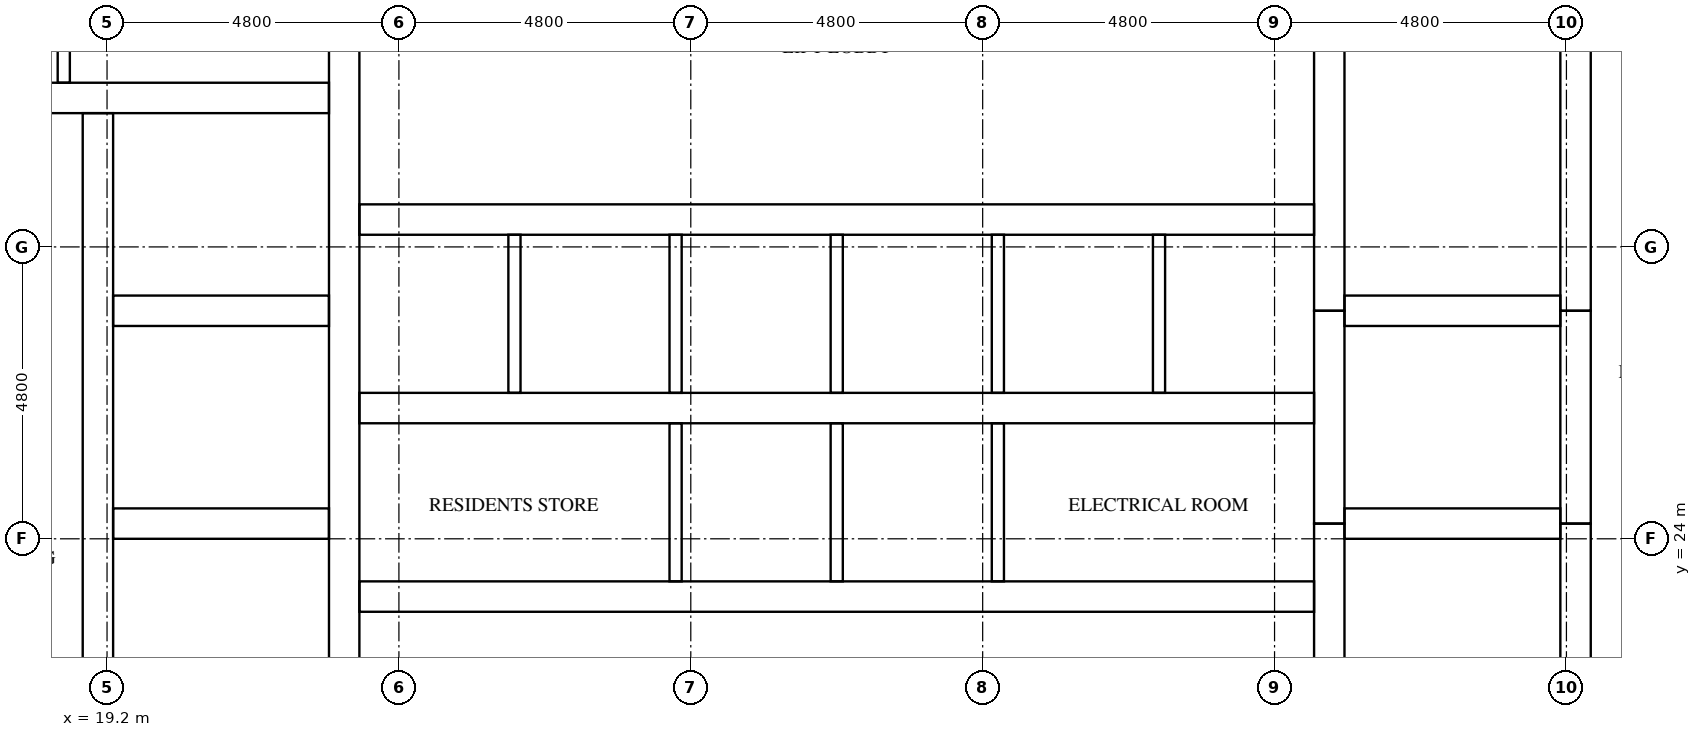
"""IFC4 building model, lengths in metres.
Left out: names, types, materials, properties, quantities, classifications, styles, units other than length and angle.
Written with IfcOpenShell. Run it as: python <this file> out.ifc"""

import sys

from ifc_helpers import new_model, si_unit, direction, frame, frame_2d, origin, place, context, subcontext, project, spatial, rectangle, extrude, element, fill, save


model = new_model("IFC4")
c1 = context("Model", 3, precision=1e-05, world=origin(), true_north=direction((0.0, 1.0)))
c2 = subcontext(c1, "Body", "Model", "MODEL_VIEW")
j1 = project(units=[si_unit("LENGTHUNIT", "METRE"), si_unit("PLANEANGLEUNIT", "RADIAN")], contexts=[c1])
p1 = place(None, origin())
s1 = spatial("IfcSite", under=j1, at=p1, CompositionType="ELEMENT")
p2 = place(p1, origin())
s2 = spatial("IfcBuilding", under=s1, at=p2, CompositionType="ELEMENT")
p3 = place(p2, frame((0.0, 0.0, 229.8)))
s3 = spatial("IfcBuildingStorey", under=s2, at=p3, CompositionType="ELEMENT", Elevation=229.8)
p4 = place(p3, frame((19.05, 15.7, 0.0), z_axis=(0.0, 0.0, 1.0), x_axis=(0.0, 1.0, 0.0)))
e1 = element("IfcWall", 1, at=p4, inside=s3, PredefinedType="SHEAR", context=c2, shape_type="SweptSolid", body=[
    extrude(rectangle(XDim=15.3, YDim=0.5, at=frame_2d((7.65, 0.0))), origin(), (0.0, 0.0, 1.0), 3.1),
])
p5 = place(p4, frame((9.75, 0.0, 0.0)))
e2 = element("IfcOpeningElement", 2, at=p5, cuts=e1, PredefinedType="OPENING", context=c2, shape_type="SweptSolid", body=[
    extrude(rectangle(XDim=1.1, YDim=2.1, at=frame_2d((0.55, 1.05))), frame((0.0, 0.26, 0.0), z_axis=(0.0, -1.0, 0.0), x_axis=(1.0, 0.0, 0.0)), (0.0, 0.0, 1.0), 0.52),
])
p6 = place(p4, frame((13.25, 0.0, 0.0)))
e3 = element("IfcOpeningElement", 3, at=p6, cuts=e1, PredefinedType="OPENING", context=c2, shape_type="SweptSolid", body=[
    extrude(rectangle(XDim=1.1, YDim=2.1, at=frame_2d((0.55, 1.05))), frame((0.0, 0.26, 0.0), z_axis=(0.0, -1.0, 0.0), x_axis=(1.0, 0.0, 0.0)), (0.0, 0.0, 1.0), 0.52),
])
p7 = place(p4, frame((0.5, 0.0, 0.0)))
e4 = element("IfcOpeningElement", 4, at=p7, cuts=e1, PredefinedType="OPENING", context=c2, shape_type="SweptSolid", body=[
    extrude(rectangle(XDim=1.2, YDim=2.1, at=frame_2d((0.6, 1.05))), frame((0.0, 0.26, 0.0), z_axis=(0.0, -1.0, 0.0), x_axis=(1.0, 0.0, 0.0)), (0.0, 0.0, 1.0), 0.52),
])
p8 = place(p3, frame((23.1, 15.7, 0.0), z_axis=(0.0, 0.0, 1.0), x_axis=(0.0, 1.0, 0.0)))
e5 = element("IfcWall", 5, at=p8, inside=s3, PredefinedType="SHEAR", context=c2, shape_type="SweptSolid", body=[
    extrude(rectangle(XDim=21.4, YDim=0.5, at=frame_2d((10.7, 0.0))), origin(), (0.0, 0.0, 1.0), 3.1),
])
p9 = place(p3, frame((39.3, 15.7, 0.0), z_axis=(0.0, 0.0, 1.0), x_axis=(0.0, 1.0, 0.0)))
e6 = element("IfcWall", 6, at=p9, inside=s3, PredefinedType="SHEAR", context=c2, shape_type="SweptSolid", body=[
    extrude(rectangle(XDim=8.55, YDim=0.5, at=frame_2d((4.275, 0.0))), origin(), (0.0, 0.0, 1.0), 3.1),
])
p10 = place(p3, frame((39.3, 24.25, 0.0), z_axis=(0.0, 0.0, 1.0), x_axis=(0.0, 1.0, 0.0)))
e7 = element("IfcWall", 7, at=p10, inside=s3, PredefinedType="SHEAR", context=c2, shape_type="SweptSolid", body=[
    extrude(rectangle(XDim=3.5, YDim=0.5, at=frame_2d((1.75, 0.0))), origin(), (0.0, 0.0, 1.0), 3.1),
])
p11 = place(p3, frame((39.3, 27.75, 0.0), z_axis=(0.0, 0.0, 1.0), x_axis=(0.0, 1.0, 0.0)))
e8 = element("IfcWall", 8, at=p11, inside=s3, PredefinedType="SHEAR", context=c2, shape_type="SweptSolid", body=[
    extrude(rectangle(XDim=9.35, YDim=0.5, at=frame_2d((4.675, 0.0))), origin(), (0.0, 0.0, 1.0), 3.1),
])
p12 = place(p3, frame((43.35, 15.7, 0.0), z_axis=(0.0, 0.0, 1.0), x_axis=(0.0, 1.0, 0.0)))
e9 = element("IfcWall", 9, at=p12, inside=s3, PredefinedType="SHEAR", context=c2, shape_type="SweptSolid", body=[
    extrude(rectangle(XDim=8.55, YDim=0.5, at=frame_2d((4.275, 0.0))), origin(), (0.0, 0.0, 1.0), 3.1),
])
p13 = place(p12, frame((0.5, 0.0, 0.0)))
e10 = element("IfcOpeningElement", 10, at=p13, cuts=e9, PredefinedType="OPENING", context=c2, shape_type="SweptSolid", body=[
    extrude(rectangle(XDim=1.2, YDim=2.1, at=frame_2d((0.6, 1.05))), frame((0.0, 0.26, 0.0), z_axis=(0.0, -1.0, 0.0), x_axis=(1.0, 0.0, 0.0)), (0.0, 0.0, 1.0), 0.52),
])
p14 = place(p3, frame((43.35, 24.25, 0.0), z_axis=(0.0, 0.0, 1.0), x_axis=(0.0, 1.0, 0.0)))
e11 = element("IfcWall", 11, at=p14, inside=s3, PredefinedType="SHEAR", context=c2, shape_type="SweptSolid", body=[
    extrude(rectangle(XDim=3.5, YDim=0.5, at=frame_2d((1.75, 0.0))), origin(), (0.0, 0.0, 1.0), 3.1),
])
p15 = place(p14, frame((1.2, 0.0, 0.0)))
e12 = element("IfcOpeningElement", 12, at=p15, cuts=e11, PredefinedType="OPENING", context=c2, shape_type="SweptSolid", body=[
    extrude(rectangle(XDim=1.1, YDim=2.1, at=frame_2d((0.55, 1.05))), frame((0.0, 0.26, 0.0), z_axis=(0.0, -1.0, 0.0), x_axis=(1.0, 0.0, 0.0)), (0.0, 0.0, 1.0), 0.52),
])
p16 = place(p3, frame((43.35, 27.75, 0.0), z_axis=(0.0, 0.0, 1.0), x_axis=(0.0, 1.0, 0.0)))
e13 = element("IfcWall", 13, at=p16, inside=s3, PredefinedType="SHEAR", context=c2, shape_type="SweptSolid", body=[
    extrude(rectangle(XDim=9.35, YDim=0.5, at=frame_2d((4.675, 0.0))), origin(), (0.0, 0.0, 1.0), 3.1),
])
p17 = place(p16, frame((7.65, 0.0, 0.0)))
e14 = element("IfcOpeningElement", 14, at=p17, cuts=e13, PredefinedType="OPENING", context=c2, shape_type="SweptSolid", body=[
    extrude(rectangle(XDim=1.2, YDim=2.1, at=frame_2d((0.6, 1.05))), frame((0.0, 0.26, 0.0), z_axis=(0.0, -1.0, 0.0), x_axis=(1.0, 0.0, 0.0)), (0.0, 0.0, 1.0), 0.52),
])
for number, where, z_axis, x_axis in (
    (15, (19.3, 24.25, 0.0), (0.0, 0.0, 1.0), (1.0, 0.0, 0.0)),
    (16, (19.3, 27.75, 0.0), (0.0, 0.0, 1.0), (1.0, 0.0, 0.0)),
):
    element("IfcWall", number, at=place(p3, frame(where, z_axis=z_axis, x_axis=x_axis)), inside=s3, PredefinedType="SHEAR", context=c2, shape_type="SweptSolid", body=[
        extrude(rectangle(XDim=3.55, YDim=0.5, at=frame_2d((1.775, 0.0))), origin(), (0.0, 0.0, 1.0), 3.1),
    ])
p18 = place(p3, frame((15.7, 31.25, 0.0), z_axis=(0.0, 0.0, 1.0), x_axis=(1.0, 0.0, 0.0)))
e17 = element("IfcWall", 17, at=p18, inside=s3, PredefinedType="SHEAR", context=c2, shape_type="SweptSolid", body=[
    extrude(rectangle(XDim=7.15, YDim=0.5, at=frame_2d((3.575, 0.0))), origin(), (0.0, 0.0, 1.0), 3.1),
])
for number, where, z_axis, x_axis in (
    (18, (39.55, 24.25, 0.0), (0.0, 0.0, 1.0), (1.0, 0.0, 0.0)),
    (19, (39.55, 27.75, 0.0), (0.0, 0.0, 1.0), (1.0, 0.0, 0.0)),
):
    element("IfcWall", number, at=place(p3, frame(where, z_axis=z_axis, x_axis=x_axis)), inside=s3, PredefinedType="SHEAR", context=c2, shape_type="SweptSolid", body=[
        extrude(rectangle(XDim=3.55, YDim=0.5, at=frame_2d((1.775, 0.0))), origin(), (0.0, 0.0, 1.0), 3.1),
    ])
p19 = place(p3, frame((23.35, 23.05, 0.0), z_axis=(0.0, 0.0, 1.0), x_axis=(1.0, 0.0, 0.0)))
e20 = element("IfcWall", 20, at=p19, inside=s3, PredefinedType="SHEAR", context=c2, shape_type="SweptSolid", body=[
    extrude(rectangle(XDim=15.7, YDim=0.5, at=frame_2d((7.85, 0.0))), origin(), (0.0, 0.0, 1.0), 3.1),
])
p20 = place(p19, frame((2.05, 0.0, 0.0)))
e21 = element("IfcOpeningElement", 21, at=p20, cuts=e20, PredefinedType="OPENING", context=c2, shape_type="SweptSolid", body=[
    extrude(rectangle(XDim=1.0, YDim=2.1, at=frame_2d((0.5, 1.05))), frame((0.0, 0.26, 0.0), z_axis=(0.0, -1.0, 0.0), x_axis=(1.0, 0.0, 0.0)), (0.0, 0.0, 1.0), 0.52),
])
p21 = place(p19, frame((12.65, 0.0, 0.0)))
e22 = element("IfcOpeningElement", 22, at=p21, cuts=e20, PredefinedType="OPENING", context=c2, shape_type="SweptSolid", body=[
    extrude(rectangle(XDim=1.0, YDim=2.1, at=frame_2d((0.5, 1.05))), frame((0.0, 0.26, 0.0), z_axis=(0.0, -1.0, 0.0), x_axis=(1.0, 0.0, 0.0)), (0.0, 0.0, 1.0), 0.52),
])
p22 = place(p3, frame((23.35, 26.15, 0.0), z_axis=(0.0, 0.0, 1.0), x_axis=(1.0, 0.0, 0.0)))
e23 = element("IfcWall", 23, at=p22, inside=s3, PredefinedType="SHEAR", context=c2, shape_type="SweptSolid", body=[
    extrude(rectangle(XDim=15.7, YDim=0.5, at=frame_2d((7.85, 0.0))), origin(), (0.0, 0.0, 1.0), 3.1),
])
p23 = place(p3, frame((23.35, 29.25, 0.0), z_axis=(0.0, 0.0, 1.0), x_axis=(1.0, 0.0, 0.0)))
e24 = element("IfcWall", 24, at=p23, inside=s3, PredefinedType="SHEAR", context=c2, shape_type="SweptSolid", body=[
    extrude(rectangle(XDim=15.7, YDim=0.5, at=frame_2d((7.85, 0.0))), origin(), (0.0, 0.0, 1.0), 3.1),
])
p24 = place(p23, frame((0.675, 0.0, 0.0)))
e25 = element("IfcOpeningElement", 25, at=p24, cuts=e24, PredefinedType="OPENING", context=c2, shape_type="SweptSolid", body=[
    extrude(rectangle(XDim=1.1, YDim=2.1, at=frame_2d((0.55, 1.05))), frame((0.0, 0.26, 0.0), z_axis=(0.0, -1.0, 0.0), x_axis=(1.0, 0.0, 0.0)), (0.0, 0.0, 1.0), 0.52),
])
p25 = place(p23, frame((3.325, 0.0, 0.0)))
e26 = element("IfcOpeningElement", 26, at=p25, cuts=e24, PredefinedType="OPENING", context=c2, shape_type="SweptSolid", body=[
    extrude(rectangle(XDim=1.1, YDim=2.1, at=frame_2d((0.55, 1.05))), frame((0.0, 0.26, 0.0), z_axis=(0.0, -1.0, 0.0), x_axis=(1.0, 0.0, 0.0)), (0.0, 0.0, 1.0), 0.52),
])
p26 = place(p23, frame((5.975, 0.0, 0.0)))
e27 = element("IfcOpeningElement", 27, at=p26, cuts=e24, PredefinedType="OPENING", context=c2, shape_type="SweptSolid", body=[
    extrude(rectangle(XDim=1.1, YDim=2.1, at=frame_2d((0.55, 1.05))), frame((0.0, 0.26, 0.0), z_axis=(0.0, -1.0, 0.0), x_axis=(1.0, 0.0, 0.0)), (0.0, 0.0, 1.0), 0.52),
])
p27 = place(p23, frame((8.625, 0.0, 0.0)))
e28 = element("IfcOpeningElement", 28, at=p27, cuts=e24, PredefinedType="OPENING", context=c2, shape_type="SweptSolid", body=[
    extrude(rectangle(XDim=1.1, YDim=2.1, at=frame_2d((0.55, 1.05))), frame((0.0, 0.26, 0.0), z_axis=(0.0, -1.0, 0.0), x_axis=(1.0, 0.0, 0.0)), (0.0, 0.0, 1.0), 0.52),
])
p28 = place(p23, frame((11.275, 0.0, 0.0)))
e29 = element("IfcOpeningElement", 29, at=p28, cuts=e24, PredefinedType="OPENING", context=c2, shape_type="SweptSolid", body=[
    extrude(rectangle(XDim=1.1, YDim=2.1, at=frame_2d((0.55, 1.05))), frame((0.0, 0.26, 0.0), z_axis=(0.0, -1.0, 0.0), x_axis=(1.0, 0.0, 0.0)), (0.0, 0.0, 1.0), 0.52),
])
p29 = place(p23, frame((13.925, 0.0, 0.0)))
e30 = element("IfcOpeningElement", 30, at=p29, cuts=e24, PredefinedType="OPENING", context=c2, shape_type="SweptSolid", body=[
    extrude(rectangle(XDim=1.1, YDim=2.1, at=frame_2d((0.55, 1.05))), frame((0.0, 0.26, 0.0), z_axis=(0.0, -1.0, 0.0), x_axis=(1.0, 0.0, 0.0)), (0.0, 0.0, 1.0), 0.52),
])
p30 = place(p3, frame((25.9, 26.4, 0.0), z_axis=(0.0, 0.0, 1.0), x_axis=(0.0, 1.0, 0.0)))
e31 = element("IfcWall", 31, at=p30, inside=s3, PredefinedType="SOLIDWALL", context=c2, shape_type="SweptSolid", body=[
    extrude(rectangle(XDim=2.6, YDim=0.2, at=frame_2d((1.3, 0.0))), origin(), (0.0, 0.0, 1.0), 3.1),
])
p31 = place(p3, frame((28.55, 23.3, 0.0), z_axis=(0.0, 0.0, 1.0), x_axis=(0.0, 1.0, 0.0)))
e32 = element("IfcWall", 32, at=p31, inside=s3, PredefinedType="SOLIDWALL", context=c2, shape_type="SweptSolid", body=[
    extrude(rectangle(XDim=2.6, YDim=0.2, at=frame_2d((1.3, 0.0))), origin(), (0.0, 0.0, 1.0), 3.1),
])
p32 = place(p3, frame((28.55, 26.4, 0.0), z_axis=(0.0, 0.0, 1.0), x_axis=(0.0, 1.0, 0.0)))
e33 = element("IfcWall", 33, at=p32, inside=s3, PredefinedType="SOLIDWALL", context=c2, shape_type="SweptSolid", body=[
    extrude(rectangle(XDim=2.6, YDim=0.2, at=frame_2d((1.3, 0.0))), origin(), (0.0, 0.0, 1.0), 3.1),
])
p33 = place(p3, frame((31.2, 23.3, 0.0), z_axis=(0.0, 0.0, 1.0), x_axis=(0.0, 1.0, 0.0)))
e34 = element("IfcWall", 34, at=p33, inside=s3, PredefinedType="SOLIDWALL", context=c2, shape_type="SweptSolid", body=[
    extrude(rectangle(XDim=2.6, YDim=0.2, at=frame_2d((1.3, 0.0))), origin(), (0.0, 0.0, 1.0), 3.1),
])
p34 = place(p3, frame((31.2, 26.4, 0.0), z_axis=(0.0, 0.0, 1.0), x_axis=(0.0, 1.0, 0.0)))
e35 = element("IfcWall", 35, at=p34, inside=s3, PredefinedType="SOLIDWALL", context=c2, shape_type="SweptSolid", body=[
    extrude(rectangle(XDim=2.6, YDim=0.2, at=frame_2d((1.3, 0.0))), origin(), (0.0, 0.0, 1.0), 3.1),
])
p35 = place(p3, frame((33.85, 23.3, 0.0), z_axis=(0.0, 0.0, 1.0), x_axis=(0.0, 1.0, 0.0)))
e36 = element("IfcWall", 36, at=p35, inside=s3, PredefinedType="SOLIDWALL", context=c2, shape_type="SweptSolid", body=[
    extrude(rectangle(XDim=2.6, YDim=0.2, at=frame_2d((1.3, 0.0))), origin(), (0.0, 0.0, 1.0), 3.1),
])
for number, where, z_axis, x_axis in (
    (37, (33.85, 26.4, 0.0), (0.0, 0.0, 1.0), (0.0, 1.0, 0.0)),
    (38, (36.5, 26.4, 0.0), (0.0, 0.0, 1.0), (0.0, 1.0, 0.0)),
):
    element("IfcWall", number, at=place(p3, frame(where, z_axis=z_axis, x_axis=x_axis)), inside=s3, PredefinedType="SOLIDWALL", context=c2, shape_type="SweptSolid", body=[
        extrude(rectangle(XDim=2.6, YDim=0.2, at=frame_2d((1.3, 0.0))), origin(), (0.0, 0.0, 1.0), 3.1),
    ])
p36 = place(p3, frame((18.489, 31.5, 0.0), z_axis=(0.0, 0.0, 1.0), x_axis=(0.0, 1.0, 0.0)))
e39 = element("IfcWall", 39, at=p36, inside=s3, PredefinedType="PARTITIONING", context=c2, shape_type="SweptSolid", body=[
    extrude(rectangle(XDim=5.6, YDim=0.2, at=frame_2d((2.8, 0.0))), origin(), (0.0, 0.0, 1.0), 3.1),
])
p37 = place(p24, origin())
e40 = element("IfcDoor", 40, at=p37, inside=s3, OperationType="DOUBLE_DOOR_SLIDING", PredefinedType="DOOR", context=c2, shape_type="SweptSolid", body=[
    extrude(rectangle(XDim=1.1, YDim=2.1, at=frame_2d((0.55, 1.05))), frame((0.0, 0.025, 0.0), z_axis=(0.0, -1.0, 0.0), x_axis=(1.0, 0.0, 0.0)), (0.0, 0.0, 1.0), 0.05),
])
fill(e25, e40)
p38 = place(p25, origin())
e41 = element("IfcDoor", 41, at=p38, inside=s3, OperationType="DOUBLE_DOOR_SLIDING", PredefinedType="DOOR", context=c2, shape_type="SweptSolid", body=[
    extrude(rectangle(XDim=1.1, YDim=2.1, at=frame_2d((0.55, 1.05))), frame((0.0, 0.025, 0.0), z_axis=(0.0, -1.0, 0.0), x_axis=(1.0, 0.0, 0.0)), (0.0, 0.0, 1.0), 0.05),
])
fill(e26, e41)
p39 = place(p26, origin())
e42 = element("IfcDoor", 42, at=p39, inside=s3, OperationType="DOUBLE_DOOR_SLIDING", PredefinedType="DOOR", context=c2, shape_type="SweptSolid", body=[
    extrude(rectangle(XDim=1.1, YDim=2.1, at=frame_2d((0.55, 1.05))), frame((0.0, 0.025, 0.0), z_axis=(0.0, -1.0, 0.0), x_axis=(1.0, 0.0, 0.0)), (0.0, 0.0, 1.0), 0.05),
])
fill(e27, e42)
p40 = place(p27, origin())
e43 = element("IfcDoor", 43, at=p40, inside=s3, OperationType="DOUBLE_DOOR_SLIDING", PredefinedType="DOOR", context=c2, shape_type="SweptSolid", body=[
    extrude(rectangle(XDim=1.1, YDim=2.1, at=frame_2d((0.55, 1.05))), frame((0.0, 0.025, 0.0), z_axis=(0.0, -1.0, 0.0), x_axis=(1.0, 0.0, 0.0)), (0.0, 0.0, 1.0), 0.05),
])
fill(e28, e43)
p41 = place(p28, origin())
e44 = element("IfcDoor", 44, at=p41, inside=s3, OperationType="DOUBLE_DOOR_SLIDING", PredefinedType="DOOR", context=c2, shape_type="SweptSolid", body=[
    extrude(rectangle(XDim=1.1, YDim=2.1, at=frame_2d((0.55, 1.05))), frame((0.0, 0.025, 0.0), z_axis=(0.0, -1.0, 0.0), x_axis=(1.0, 0.0, 0.0)), (0.0, 0.0, 1.0), 0.05),
])
fill(e29, e44)
p42 = place(p29, origin())
e45 = element("IfcDoor", 45, at=p42, inside=s3, OperationType="DOUBLE_DOOR_SLIDING", PredefinedType="DOOR", context=c2, shape_type="SweptSolid", body=[
    extrude(rectangle(XDim=1.1, YDim=2.1, at=frame_2d((0.55, 1.05))), frame((0.0, 0.025, 0.0), z_axis=(0.0, -1.0, 0.0), x_axis=(1.0, 0.0, 0.0)), (0.0, 0.0, 1.0), 0.05),
])
fill(e30, e45)
p43 = place(p5, origin())
e46 = element("IfcDoor", 46, at=p43, inside=s3, OperationType="DOUBLE_DOOR_SLIDING", PredefinedType="DOOR", context=c2, shape_type="SweptSolid", body=[
    extrude(rectangle(XDim=1.1, YDim=2.1, at=frame_2d((0.55, 1.05))), frame((0.0, 0.025, 0.0), z_axis=(0.0, -1.0, 0.0), x_axis=(1.0, 0.0, 0.0)), (0.0, 0.0, 1.0), 0.05),
])
fill(e2, e46)
p44 = place(p6, origin())
e47 = element("IfcDoor", 47, at=p44, inside=s3, OperationType="DOUBLE_DOOR_SLIDING", PredefinedType="DOOR", context=c2, shape_type="SweptSolid", body=[
    extrude(rectangle(XDim=1.1, YDim=2.1, at=frame_2d((0.55, 1.05))), frame((0.0, 0.025, 0.0), z_axis=(0.0, -1.0, 0.0), x_axis=(1.0, 0.0, 0.0)), (0.0, 0.0, 1.0), 0.05),
])
fill(e3, e47)
p45 = place(p15, origin())
e48 = element("IfcDoor", 48, at=p45, inside=s3, OperationType="DOUBLE_DOOR_SLIDING", PredefinedType="DOOR", context=c2, shape_type="SweptSolid", body=[
    extrude(rectangle(XDim=1.1, YDim=2.1, at=frame_2d((0.55, 1.05))), frame((0.0, 0.025, 0.0), z_axis=(0.0, -1.0, 0.0), x_axis=(1.0, 0.0, 0.0)), (0.0, 0.0, 1.0), 0.05),
])
fill(e12, e48)
p46 = place(p20, frame((1.0, 0.0, 0.0), z_axis=(0.0, 0.0, 1.0), x_axis=(-1.0, 0.0, 0.0)))
e49 = element("IfcDoor", 49, at=p46, inside=s3, OperationType="SINGLE_SWING_LEFT", PredefinedType="DOOR", context=c2, shape_type="SweptSolid", body=[
    extrude(rectangle(XDim=1.0, YDim=2.1, at=frame_2d((0.5, 1.05))), frame((0.0, 0.025, 0.0), z_axis=(0.0, -1.0, 0.0), x_axis=(1.0, 0.0, 0.0)), (0.0, 0.0, 1.0), 0.05),
])
fill(e21, e49)
p47 = place(p21, frame((1.0, 0.0, 0.0), z_axis=(0.0, 0.0, 1.0), x_axis=(-1.0, 0.0, 0.0)))
e50 = element("IfcDoor", 50, at=p47, inside=s3, OperationType="SINGLE_SWING_RIGHT", PredefinedType="DOOR", context=c2, shape_type="SweptSolid", body=[
    extrude(rectangle(XDim=1.0, YDim=2.1, at=frame_2d((0.5, 1.05))), frame((0.0, 0.025, 0.0), z_axis=(0.0, -1.0, 0.0), x_axis=(1.0, 0.0, 0.0)), (0.0, 0.0, 1.0), 0.05),
])
fill(e22, e50)
save(model, sys.argv[1])
